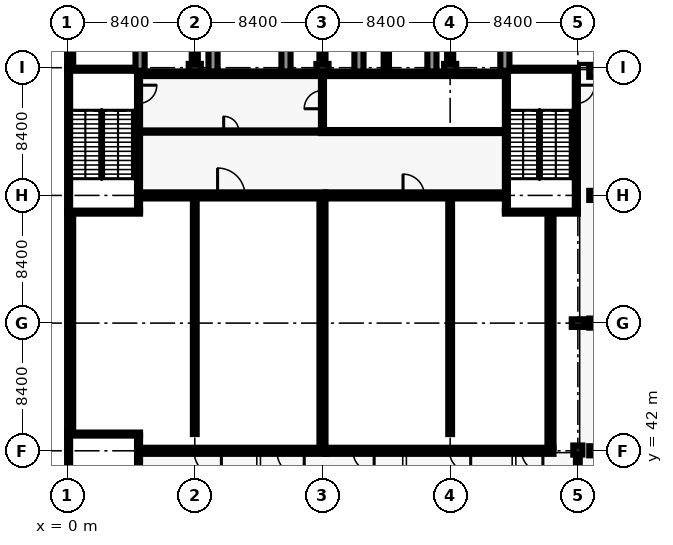
"""IFC4 building model, lengths in metres.
Left out: names, types, materials, properties, quantities, classifications, styles, units other than length and angle.
Written with IfcOpenShell. Run it as: python <this file> out.ifc"""

import sys

from ifc_helpers import new_model, si_unit, direction, frame, frame_2d, origin, origin_2d, place, context, subcontext, project, spatial, polyline, rectangle, outline, extrude, element, fill, save


model = new_model("IFC4")
c1 = context("Model", 3, precision=1e-05, world=origin(), true_north=direction((0.0, 1.0)))
c2 = subcontext(c1, "Body", "Model", "MODEL_VIEW")
j1 = project(units=[si_unit("LENGTHUNIT", "METRE"), si_unit("PLANEANGLEUNIT", "RADIAN")], contexts=[c1])
p1 = place(None, origin())
s1 = spatial("IfcSite", under=j1, at=p1, CompositionType="ELEMENT")
p2 = place(p1, origin())
s2 = spatial("IfcBuilding", under=s1, at=p2, CompositionType="ELEMENT")
p3 = place(p2, frame((0.0, 0.0, 10.2)))
s3 = spatial("IfcBuildingStorey", under=s2, at=p3, CompositionType="ELEMENT", Elevation=10.2)
p4 = place(p3, frame((0.0, 43.1, 0.0), z_axis=(0.0, 0.0, 1.0), x_axis=(1.0, 0.0, 0.0)))
e1 = element("IfcWall", 1, at=p4, inside=s3, PredefinedType="SHEAR", context=c2, shape_type="SweptSolid", body=[
    extrude(rectangle(XDim=4.8, YDim=0.2, at=frame_2d((2.4, 0.0))), origin(), (0.0, 0.0, 1.0), 4.8),
])
p5 = place(p3, frame((0.1, 33.8, 0.0), z_axis=(0.0, 0.0, 1.0), x_axis=(0.0, 1.0, 0.0)))
e2 = element("IfcWall", 2, at=p5, inside=s3, PredefinedType="SHEAR", context=c2, shape_type="SweptSolid", body=[
    extrude(rectangle(XDim=9.2, YDim=0.2, at=frame_2d((4.6, 0.0))), origin(), (0.0, 0.0, 1.0), 4.8),
])
p6 = place(p3, frame((4.7, 43.0, 0.0), z_axis=(0.0, 0.0, 1.0), x_axis=(0.0, -1.0, 0.0)))
e3 = element("IfcWall", 3, at=p6, inside=s3, PredefinedType="SHEAR", context=c2, shape_type="SweptSolid", body=[
    extrude(rectangle(XDim=9.2, YDim=0.2, at=frame_2d((4.6, 0.0))), origin(), (0.0, 0.0, 1.0), 4.8),
])
p7 = place(p6, frame((7.05, 0.0, 0.0)))
e4 = element("IfcOpeningElement", 4, at=p7, cuts=e3, PredefinedType="OPENING", context=c2, shape_type="SweptSolid", body=[
    extrude(rectangle(XDim=1.2, YDim=2.1, at=frame_2d((0.6, 1.05))), frame((0.0, 0.11, 0.0), z_axis=(0.0, -1.0, 0.0), x_axis=(1.0, 0.0, 0.0)), (0.0, 0.0, 1.0), 0.22),
])
for number, where, z_axis, x_axis in (
    (5, (4.8, 57.7, 0.0), (0.0, 0.0, 1.0), (-1.0, 0.0, 0.0)),
    (6, (0.0, 67.1, 0.0), (0.0, 0.0, 1.0), (1.0, 0.0, 0.0)),
):
    element("IfcWall", number, at=place(p3, frame(where, z_axis=z_axis, x_axis=x_axis)), inside=s3, PredefinedType="SHEAR", context=c2, shape_type="SweptSolid", body=[
        extrude(rectangle(XDim=4.8, YDim=0.2, at=frame_2d((2.4, 0.0))), origin(), (0.0, 0.0, 1.0), 4.8),
    ])
p8 = place(p3, frame((0.1, 57.8, 0.0), z_axis=(0.0, 0.0, 1.0), x_axis=(0.0, 1.0, 0.0)))
e7 = element("IfcWall", 7, at=p8, inside=s3, PredefinedType="SHEAR", context=c2, shape_type="SweptSolid", body=[
    extrude(rectangle(XDim=9.2, YDim=0.2, at=frame_2d((4.6, 0.0))), origin(), (0.0, 0.0, 1.0), 4.8),
])
p9 = place(p3, frame((4.7, 67.0, 0.0), z_axis=(0.0, 0.0, 1.0), x_axis=(0.0, -1.0, 0.0)))
e8 = element("IfcWall", 8, at=p9, inside=s3, PredefinedType="SHEAR", context=c2, shape_type="SweptSolid", body=[
    extrude(rectangle(XDim=9.2, YDim=0.2, at=frame_2d((4.6, 0.0))), origin(), (0.0, 0.0, 1.0), 4.8),
])
p10 = place(p9, frame((0.95, 0.0, 0.0)))
e9 = element("IfcOpeningElement", 9, at=p10, cuts=e8, PredefinedType="OPENING", context=c2, shape_type="SweptSolid", body=[
    extrude(rectangle(XDim=1.2, YDim=2.1, at=frame_2d((0.6, 1.05))), frame((0.0, 0.11, 0.0), z_axis=(0.0, -1.0, 0.0), x_axis=(1.0, 0.0, 0.0)), (0.0, 0.0, 1.0), 0.22),
])
for number, where, z_axis, x_axis in (
    (10, (33.6, 57.7, 0.0), (0.0, 0.0, 1.0), (-1.0, 0.0, 0.0)),
    (11, (28.8, 67.1, 0.0), (0.0, 0.0, 1.0), (1.0, 0.0, 0.0)),
):
    element("IfcWall", number, at=place(p3, frame(where, z_axis=z_axis, x_axis=x_axis)), inside=s3, PredefinedType="SHEAR", context=c2, shape_type="SweptSolid", body=[
        extrude(rectangle(XDim=4.8, YDim=0.2, at=frame_2d((2.4, 0.0))), origin(), (0.0, 0.0, 1.0), 4.8),
    ])
p11 = place(p3, frame((28.9, 57.8, 0.0), z_axis=(0.0, 0.0, 1.0), x_axis=(0.0, 1.0, 0.0)))
e12 = element("IfcWall", 12, at=p11, inside=s3, PredefinedType="SHEAR", context=c2, shape_type="SweptSolid", body=[
    extrude(rectangle(XDim=9.2, YDim=0.2, at=frame_2d((4.6, 0.0))), origin(), (0.0, 0.0, 1.0), 4.8),
])
p12 = place(p3, frame((33.5, 67.0, 0.0), z_axis=(0.0, 0.0, 1.0), x_axis=(0.0, -1.0, 0.0)))
e13 = element("IfcWall", 13, at=p12, inside=s3, PredefinedType="SHEAR", context=c2, shape_type="SweptSolid", body=[
    extrude(rectangle(XDim=9.2, YDim=0.2, at=frame_2d((4.6, 0.0))), origin(), (0.0, 0.0, 1.0), 4.8),
])
p13 = place(p12, frame((0.95, 0.0, 0.0)))
e14 = element("IfcOpeningElement", 14, at=p13, cuts=e13, PredefinedType="OPENING", context=c2, shape_type="SweptSolid", body=[
    extrude(rectangle(XDim=1.2, YDim=2.1, at=frame_2d((0.6, 1.05))), frame((0.0, 0.11, 0.0), z_axis=(0.0, -1.0, 0.0), x_axis=(1.0, 0.0, 0.0)), (0.0, 0.0, 1.0), 0.22),
])
p14 = place(p3, frame((17.0, 42.0, 0.0), z_axis=(0.0, 0.0, 1.0), x_axis=(-1.0, 0.0, 0.0)))
e15 = element("IfcWall", 15, at=p14, inside=s3, PredefinedType="SHEAR", context=c2, shape_type="SweptSolid", body=[
    extrude(rectangle(XDim=12.2, YDim=0.4, at=frame_2d((6.1, 0.0))), origin(), (0.0, 0.0, 1.0), 4.8),
])
p15 = place(p14, frame((6.85, 0.0, 0.0)))
e16 = element("IfcOpeningElement", 16, at=p15, cuts=e15, PredefinedType="OPENING", context=c2, shape_type="SweptSolid", body=[
    extrude(rectangle(XDim=1.8, YDim=2.1, at=frame_2d((0.9, 1.05))), frame((0.0, 0.21, 0.0), z_axis=(0.0, -1.0, 0.0), x_axis=(1.0, 0.0, 0.0)), (0.0, 0.0, 1.0), 0.42),
])
p16 = place(p14, frame((1.4, 0.0, 0.0)))
e17 = element("IfcOpeningElement", 17, at=p16, cuts=e15, PredefinedType="OPENING", context=c2, shape_type="SweptSolid", body=[
    extrude(rectangle(XDim=1.8, YDim=2.1, at=frame_2d((0.9, 1.05))), frame((0.0, 0.21, 0.0), z_axis=(0.0, -1.0, 0.0), x_axis=(1.0, 0.0, 0.0)), (0.0, 0.0, 1.0), 0.42),
])
p17 = place(p3, frame((4.8, 58.8, 0.0), z_axis=(0.0, 0.0, 1.0), x_axis=(1.0, 0.0, 0.0)))
e18 = element("IfcWall", 18, at=p17, inside=s3, PredefinedType="SHEAR", context=c2, shape_type="SweptSolid", body=[
    extrude(rectangle(XDim=12.2, YDim=0.4, at=frame_2d((6.1, 0.0))), origin(), (0.0, 0.0, 1.0), 4.8),
])
p18 = place(p17, frame((5.1, 0.0, 0.0)))
e19 = element("IfcOpeningElement", 19, at=p18, cuts=e18, PredefinedType="OPENING", context=c2, shape_type="SweptSolid", body=[
    extrude(rectangle(XDim=1.8, YDim=2.1, at=frame_2d((0.9, 1.05))), frame((0.0, 0.21, 0.0), z_axis=(0.0, -1.0, 0.0), x_axis=(1.0, 0.0, 0.0)), (0.0, 0.0, 1.0), 0.42),
])
p19 = place(p3, frame((0.2, 43.2, 0.0), z_axis=(0.0, 0.0, 1.0), x_axis=(0.0, 1.0, 0.0)))
e20 = element("IfcWall", 20, at=p19, inside=s3, PredefinedType="SHEAR", context=c2, shape_type="SweptSolid", body=[
    extrude(rectangle(XDim=14.4, YDim=0.4, at=frame_2d((7.2, 0.0))), origin(), (0.0, 0.0, 1.0), 4.8),
])
p20 = place(p3, frame((16.8, 58.6, 0.0), z_axis=(0.0, 0.0, 1.0), x_axis=(0.0, -1.0, 0.0)))
e21 = element("IfcWall", 21, at=p20, inside=s3, PredefinedType="SHEAR", context=c2, shape_type="SweptSolid", body=[
    extrude(rectangle(XDim=16.4, YDim=0.4, at=frame_2d((8.2, 0.0))), origin(), (0.0, 0.0, 1.0), 4.8),
])
p21 = place(p3, frame((32.0, 42.0, 0.0), z_axis=(0.0, 0.0, 1.0), x_axis=(-1.0, 0.0, 0.0)))
e22 = element("IfcWall", 22, at=p21, inside=s3, PredefinedType="SHEAR", context=c2, shape_type="SweptSolid", body=[
    extrude(rectangle(XDim=15.0, YDim=0.4, at=frame_2d((7.5, 0.0))), origin(), (0.0, 0.0, 1.0), 4.8),
])
p22 = place(p21, frame((0.7, 0.0, 0.0)))
e23 = element("IfcOpeningElement", 23, at=p22, cuts=e22, PredefinedType="OPENING", context=c2, shape_type="SweptSolid", body=[
    extrude(rectangle(XDim=1.4, YDim=2.1, at=frame_2d((0.7, 1.05))), frame((0.0, 0.21, 0.0), z_axis=(0.0, -1.0, 0.0), x_axis=(1.0, 0.0, 0.0)), (0.0, 0.0, 1.0), 0.42),
])
p23 = place(p21, frame((11.8, 0.0, 0.0)))
e24 = element("IfcOpeningElement", 24, at=p23, cuts=e22, PredefinedType="OPENING", context=c2, shape_type="SweptSolid", body=[
    extrude(rectangle(XDim=1.4, YDim=2.1, at=frame_2d((0.7, 1.05))), frame((0.0, 0.21, 0.0), z_axis=(0.0, -1.0, 0.0), x_axis=(1.0, 0.0, 0.0)), (0.0, 0.0, 1.0), 0.42),
])
p24 = place(p21, frame((5.45, 0.0, 0.0)))
e25 = element("IfcOpeningElement", 25, at=p24, cuts=e22, PredefinedType="OPENING", context=c2, shape_type="SweptSolid", body=[
    extrude(rectangle(XDim=1.4, YDim=2.1, at=frame_2d((0.7, 1.05))), frame((0.0, 0.21, 0.0), z_axis=(0.0, -1.0, 0.0), x_axis=(1.0, 0.0, 0.0)), (0.0, 0.0, 1.0), 0.42),
])
p25 = place(p3, frame((17.0, 58.8, 0.0), z_axis=(0.0, 0.0, 1.0), x_axis=(1.0, 0.0, 0.0)))
e26 = element("IfcWall", 26, at=p25, inside=s3, PredefinedType="SHEAR", context=c2, shape_type="SweptSolid", body=[
    extrude(rectangle(XDim=11.8, YDim=0.4, at=frame_2d((5.9, 0.0))), origin(), (0.0, 0.0, 1.0), 4.8),
])
p26 = place(p25, frame((5.1, 0.0, 0.0)))
e27 = element("IfcOpeningElement", 27, at=p26, cuts=e26, PredefinedType="OPENING", context=c2, shape_type="SweptSolid", body=[
    extrude(rectangle(XDim=1.4, YDim=2.1, at=frame_2d((0.7, 1.05))), frame((0.0, 0.21, 0.0), z_axis=(0.0, -1.0, 0.0), x_axis=(1.0, 0.0, 0.0)), (0.0, 0.0, 1.0), 0.42),
])
p27 = place(p3, frame((31.8, 57.6, 0.0), z_axis=(0.0, 0.0, 1.0), x_axis=(0.0, -1.0, 0.0)))
e28 = element("IfcWall", 28, at=p27, inside=s3, PredefinedType="SHEAR", context=c2, shape_type="SweptSolid", body=[
    extrude(rectangle(XDim=15.4, YDim=0.4, at=frame_2d((7.7, 0.0))), origin(), (0.0, 0.0, 1.0), 4.8),
])
for number, where, z_axis, x_axis in (
    (29, (8.4, 43.1, 0.0), (0.0, 0.0, 1.0), (0.0, 1.0, 0.0)),
    (30, (25.2, 43.1, 0.0), (0.0, 0.0, 1.0), (0.0, 1.0, 0.0)),
):
    element("IfcWall", number, at=place(p3, frame(where, z_axis=z_axis, x_axis=x_axis)), inside=s3, PredefinedType="SOLIDWALL", context=c2, shape_type="SweptSolid", body=[
        extrude(outline(polyline([(0.0, 0.0), (15.5, 0.0), (15.5, 2.324), (0.0, 0.154), (0.0, 0.0)])), frame((0.0, 0.125, 0.0), z_axis=(0.0, -1.0, 0.0), x_axis=(1.0, 0.0, 0.0)), (0.0, 0.0, 1.0), 0.25),
    ])
for number, where, z_axis, x_axis in (
    (31, (8.4, 67.2, 0.0), (0.0, 0.0, 1.0), (1.0, 0.0, 0.0)),
    (32, (16.8, 67.2, 0.0), (0.0, 0.0, 1.0), (1.0, 0.0, 0.0)),
    (33, (25.2, 67.2, 0.0), (0.0, 0.0, 1.0), (1.0, 0.0, 0.0)),
    (34, (33.6, 50.4, 0.0), (0.0, 0.0, 1.0), (0.0, 1.0, 0.0)),
):
    element("IfcColumn", number, at=place(p3, frame(where, z_axis=z_axis, x_axis=x_axis)), inside=s3, PredefinedType="COLUMN", context=c2, shape_type="SweptSolid", body=[
        extrude(rectangle(XDim=0.8, YDim=0.5, at=origin_2d()), origin(), (0.0, 0.0, 1.0), 4.8),
    ])
for number, where, z_axis, x_axis in (
    (35, (34.65, 42.0, 0.0), (0.0, 0.0, 1.0), (1.0, 0.0, 0.0)),
    (36, (34.65, 50.4, 0.0), (0.0, 0.0, 1.0), (1.0, 0.0, 0.0)),
    (37, (34.65, 58.8, 0.0), (0.0, 0.0, 1.0), (1.0, 0.0, 0.0)),
    (38, (34.65, 66.9, 0.0), (0.0, 0.0, 1.0), (1.0, 0.0, 0.0)),
    (39, (33.6, 42.05, 0.0), (0.0, 0.0, 1.0), (1.0, 0.0, 0.0)),
):
    element("IfcColumn", number, at=place(p3, frame(where, z_axis=z_axis, x_axis=x_axis)), inside=s3, PredefinedType="COLUMN", context=c2, shape_type="SweptSolid", body=[
        extrude(rectangle(XDim=0.6, YDim=0.6, at=origin_2d()), origin(), (0.0, 0.0, 1.0), 4.8),
    ])
p28 = place(p3, frame((4.8, 66.8, 0.0), z_axis=(0.0, 0.0, 1.0), x_axis=(1.0, 0.0, 0.0)))
e40 = element("IfcWall", 40, at=p28, inside=s3, PredefinedType="SOLIDWALL", context=c2, shape_type="SweptSolid", body=[
    extrude(rectangle(XDim=24.0, YDim=0.3, at=frame_2d((12.0, 0.0))), origin(), (0.0, 0.0, 1.0), 4.5),
])
p29 = place(p28, frame((0.6, 0.0, 0.9)))
e41 = element("IfcOpeningElement", 41, at=p29, cuts=e40, PredefinedType="OPENING", context=c2, shape_type="SweptSolid", body=[
    extrude(rectangle(XDim=1.8, YDim=1.5, at=frame_2d((0.9, 0.75))), frame((0.0, 0.16, 0.0), z_axis=(0.0, -1.0, 0.0), x_axis=(1.0, 0.0, 0.0)), (0.0, 0.0, 1.0), 0.32),
])
p30 = place(p28, frame((21.9, 0.0, 0.9)))
e42 = element("IfcOpeningElement", 42, at=p30, cuts=e40, PredefinedType="OPENING", context=c2, shape_type="SweptSolid", body=[
    extrude(rectangle(XDim=1.2, YDim=1.8, at=frame_2d((0.6, 0.9))), frame((0.0, 0.16, 0.0), z_axis=(0.0, -1.0, 0.0), x_axis=(1.0, 0.0, 0.0)), (0.0, 0.0, 1.0), 0.32),
])
for number, where, z_axis, x_axis in (
    (43, (0.2, 67.8, 0.0), (0.0, 0.0, 1.0), (1.0, 0.0, 0.0)),
    (44, (8.4, 68.05, 0.0), (0.0, 0.0, 1.0), (1.0, 0.0, 0.0)),
    (45, (16.8, 68.05, 0.0), (0.0, 0.0, 1.0), (1.0, 0.0, 0.0)),
):
    element("IfcColumn", number, at=place(p3, frame(where, z_axis=z_axis, x_axis=x_axis)), inside=s3, PredefinedType="PILASTER", context=c2, shape_type="SweptSolid", body=[
        extrude(rectangle(XDim=0.4, YDim=1.2, at=origin_2d()), origin(), (0.0, 0.0, 1.0), 4.8),
    ])
p31 = place(p3, frame((21.0, 67.65, 0.0), z_axis=(0.0, 0.0, 1.0), x_axis=(1.0, 0.0, 0.0)))
e46 = element("IfcColumn", 46, at=p31, inside=s3, PredefinedType="PILASTER", context=c2, shape_type="SweptSolid", body=[
    extrude(rectangle(XDim=0.35, YDim=0.9, at=origin_2d()), origin(), (0.0, 0.0, 1.0), 4.8),
])
p32 = place(p3, frame((25.2, 68.05, 0.0), z_axis=(0.0, 0.0, 1.0), x_axis=(1.0, 0.0, 0.0)))
e47 = element("IfcColumn", 47, at=p32, inside=s3, PredefinedType="PILASTER", context=c2, shape_type="SweptSolid", body=[
    extrude(rectangle(XDim=0.4, YDim=1.2, at=origin_2d()), origin(), (0.0, 0.0, 1.0), 4.8),
])
p33 = place(p3, frame((4.8, 67.0, 0.0), z_axis=(0.0, 0.0, 1.0), x_axis=(0.0, 1.0, 0.0)))
e48 = element("IfcWall", 48, at=p33, inside=s3, PredefinedType="SOLIDWALL", context=c2, shape_type="SweptSolid", body=[
    extrude(rectangle(XDim=1.7, YDim=0.6, at=frame_2d((0.85, 0.0))), origin(), (0.0, 0.0, 1.0), 4.8),
])
for number, where, z_axis, x_axis in (
    (49, (9.6, 66.95, 0.0), (0.0, 0.0, 1.0), (0.0, 1.0, 0.0)),
    (50, (14.4, 66.95, 0.0), (0.0, 0.0, 1.0), (0.0, 1.0, 0.0)),
    (51, (19.2, 66.95, 0.0), (0.0, 0.0, 1.0), (0.0, 1.0, 0.0)),
    (52, (24.0, 66.95, 0.0), (0.0, 0.0, 1.0), (0.0, 1.0, 0.0)),
):
    element("IfcWall", number, at=place(p3, frame(where, z_axis=z_axis, x_axis=x_axis)), inside=s3, PredefinedType="SOLIDWALL", context=c2, shape_type="SweptSolid", body=[
        extrude(rectangle(XDim=1.75, YDim=0.6, at=frame_2d((0.875, 0.0))), origin(), (0.0, 0.0, 1.0), 4.8),
    ])
p34 = place(p3, frame((28.8, 67.0, 0.0), z_axis=(0.0, 0.0, 1.0), x_axis=(0.0, 1.0, 0.0)))
e53 = element("IfcWall", 53, at=p34, inside=s3, PredefinedType="SOLIDWALL", context=c2, shape_type="SweptSolid", body=[
    extrude(rectangle(XDim=1.7, YDim=0.6, at=frame_2d((0.85, 0.0))), origin(), (0.0, 0.0, 1.0), 4.8),
])
p35 = place(p3, frame((33.6, 34.3, 0.0), z_axis=(0.0, 0.0, 1.0), x_axis=(0.0, 1.0, 0.0)))
e54 = element("IfcWall", 54, at=p35, inside=s3, PredefinedType="SOLIDWALL", context=c2, shape_type="SweptSolid", body=[
    extrude(rectangle(XDim=7.825, YDim=0.25, at=frame_2d((3.913, 0.0))), origin(), (0.0, 0.0, 1.0), 3.8),
])
p36 = place(p35, frame((2.9, 0.0, 0.0)))
e55 = element("IfcOpeningElement", 55, at=p36, cuts=e54, PredefinedType="OPENING", context=c2, shape_type="SweptSolid", body=[
    extrude(rectangle(XDim=1.2, YDim=2.1, at=frame_2d((0.6, 1.05))), frame((0.0, 0.135, 0.0), z_axis=(0.0, -1.0, 0.0), x_axis=(1.0, 0.0, 0.0)), (0.0, 0.0, 1.0), 0.27),
])
p37 = place(p3, frame((16.7, 63.0, 0.0), z_axis=(0.0, 0.0, 1.0), x_axis=(1.0, 0.0, 0.0)))
e56 = element("IfcWall", 56, at=p37, inside=s3, PredefinedType="SOLIDWALL", context=c2, shape_type="SweptSolid", body=[
    extrude(rectangle(XDim=12.1, YDim=0.2, at=frame_2d((6.05, 0.0))), origin(), (0.0, 0.0, 1.0), 3.8),
])
p38 = place(p3, frame((16.8, 63.1, 0.0), z_axis=(0.0, 0.0, 1.0), x_axis=(0.0, 1.0, 0.0)))
e57 = element("IfcWall", 57, at=p38, inside=s3, PredefinedType="SOLIDWALL", context=c2, shape_type="SweptSolid", body=[
    extrude(rectangle(XDim=3.55, YDim=0.2, at=frame_2d((1.775, 0.0))), origin(), (0.0, 0.0, 1.0), 3.8),
])
p39 = place(p38, frame((1.4, 0.0, 0.0)))
e58 = element("IfcOpeningElement", 58, at=p39, cuts=e57, PredefinedType="OPENING", context=c2, shape_type="SweptSolid", body=[
    extrude(rectangle(XDim=1.2, YDim=2.1, at=frame_2d((0.6, 1.05))), frame((0.0, 0.11, 0.0), z_axis=(0.0, -1.0, 0.0), x_axis=(1.0, 0.0, 0.0)), (0.0, 0.0, 1.0), 0.22),
])
p40 = place(p3, frame((16.8, 66.95, 0.0), z_axis=(0.0, 0.0, 1.0), x_axis=(0.0, 1.0, 0.0)))
e59 = element("IfcWall", 59, at=p40, inside=s3, PredefinedType="SOLIDWALL", context=c2, shape_type="SweptSolid", body=[
    extrude(rectangle(XDim=0.35, YDim=0.2, at=frame_2d((0.175, 0.0))), origin(), (0.0, 0.0, 1.0), 3.8),
])
p41 = place(p3, frame((4.8, 63.0, 0.0), z_axis=(0.0, 0.0, 1.0), x_axis=(1.0, 0.0, 0.0)))
e60 = element("IfcWall", 60, at=p41, inside=s3, PredefinedType="PARTITIONING", context=c2, shape_type="SweptSolid", body=[
    extrude(rectangle(XDim=11.9, YDim=0.15, at=frame_2d((5.95, 0.0))), origin(), (0.0, 0.0, 1.0), 3.8),
])
p42 = place(p41, frame((5.5, 0.0, 0.0)))
e61 = element("IfcOpeningElement", 61, at=p42, cuts=e60, PredefinedType="OPENING", context=c2, shape_type="SweptSolid", body=[
    extrude(rectangle(XDim=1.0, YDim=2.1, at=frame_2d((0.5, 1.05))), frame((0.0, 0.085, 0.0), z_axis=(0.0, -1.0, 0.0), x_axis=(1.0, 0.0, 0.0)), (0.0, 0.0, 1.0), 0.17),
])
p43 = place(p29, origin())
e62 = element("IfcWindow", 62, at=p43, inside=s3, PartitioningType="SINGLE_PANEL", PredefinedType="WINDOW", context=c2, shape_type="SweptSolid", body=[
    extrude(rectangle(XDim=1.8, YDim=1.5, at=frame_2d((0.9, 0.75))), frame((0.0, 0.03, 0.0), z_axis=(0.0, -1.0, 0.0), x_axis=(1.0, 0.0, 0.0)), (0.0, 0.0, 1.0), 0.06),
])
fill(e41, e62)
p44 = place(p30, origin())
e63 = element("IfcWindow", 63, at=p44, inside=s3, PartitioningType="SINGLE_PANEL", PredefinedType="WINDOW", context=c2, shape_type="SweptSolid", body=[
    extrude(rectangle(XDim=1.2, YDim=1.8, at=frame_2d((0.6, 0.9))), frame((0.0, 0.03, 0.0), z_axis=(0.0, -1.0, 0.0), x_axis=(1.0, 0.0, 0.0)), (0.0, 0.0, 1.0), 0.06),
])
fill(e42, e63)
p45 = place(p10, origin())
e64 = element("IfcDoor", 64, at=p45, inside=s3, OperationType="SINGLE_SWING_RIGHT", PredefinedType="DOOR", context=c2, shape_type="SweptSolid", body=[
    extrude(rectangle(XDim=1.2, YDim=2.1, at=frame_2d((0.6, 1.05))), frame((0.0, 0.025, 0.0), z_axis=(0.0, -1.0, 0.0), x_axis=(1.0, 0.0, 0.0)), (0.0, 0.0, 1.0), 0.05),
])
fill(e9, e64)
p46 = place(p13, origin())
e65 = element("IfcDoor", 65, at=p46, inside=s3, OperationType="SINGLE_SWING_RIGHT", PredefinedType="DOOR", context=c2, shape_type="SweptSolid", body=[
    extrude(rectangle(XDim=1.2, YDim=2.1, at=frame_2d((0.6, 1.05))), frame((0.0, 0.025, 0.0), z_axis=(0.0, -1.0, 0.0), x_axis=(1.0, 0.0, 0.0)), (0.0, 0.0, 1.0), 0.05),
])
fill(e14, e65)
p47 = place(p15, origin())
e66 = element("IfcDoor", 66, at=p47, inside=s3, OperationType="DOUBLE_DOOR_SINGLE_SWING", PredefinedType="DOOR", context=c2, shape_type="SweptSolid", body=[
    extrude(rectangle(XDim=1.8, YDim=2.1, at=frame_2d((0.9, 1.05))), frame((0.0, 0.025, 0.0), z_axis=(0.0, -1.0, 0.0), x_axis=(1.0, 0.0, 0.0)), (0.0, 0.0, 1.0), 0.05),
])
fill(e16, e66)
p48 = place(p42, origin())
e67 = element("IfcDoor", 67, at=p48, inside=s3, OperationType="SINGLE_SWING_RIGHT", PredefinedType="DOOR", context=c2, shape_type="SweptSolid", body=[
    extrude(rectangle(XDim=1.0, YDim=2.1, at=frame_2d((0.5, 1.05))), frame((0.0, 0.025, 0.0), z_axis=(0.0, -1.0, 0.0), x_axis=(1.0, 0.0, 0.0)), (0.0, 0.0, 1.0), 0.05),
])
fill(e61, e67)
p49 = place(p39, origin())
e68 = element("IfcDoor", 68, at=p49, inside=s3, OperationType="SINGLE_SWING_LEFT", PredefinedType="DOOR", context=c2, shape_type="SweptSolid", body=[
    extrude(rectangle(XDim=1.2, YDim=2.1, at=frame_2d((0.6, 1.05))), frame((0.0, 0.025, 0.0), z_axis=(0.0, -1.0, 0.0), x_axis=(1.0, 0.0, 0.0)), (0.0, 0.0, 1.0), 0.05),
])
fill(e58, e68)
p50 = place(p22, origin())
e69 = element("IfcDoor", 69, at=p50, inside=s3, OperationType="DOUBLE_DOOR_SINGLE_SWING", PredefinedType="DOOR", context=c2, shape_type="SweptSolid", body=[
    extrude(rectangle(XDim=1.4, YDim=2.1, at=frame_2d((0.7, 1.05))), frame((0.0, 0.025, 0.0), z_axis=(0.0, -1.0, 0.0), x_axis=(1.0, 0.0, 0.0)), (0.0, 0.0, 1.0), 0.05),
])
fill(e23, e69)
p51 = place(p16, origin())
e70 = element("IfcDoor", 70, at=p51, inside=s3, OperationType="DOUBLE_DOOR_SINGLE_SWING", PredefinedType="DOOR", context=c2, shape_type="SweptSolid", body=[
    extrude(rectangle(XDim=1.8, YDim=2.1, at=frame_2d((0.9, 1.05))), frame((0.0, 0.025, 0.0), z_axis=(0.0, -1.0, 0.0), x_axis=(1.0, 0.0, 0.0)), (0.0, 0.0, 1.0), 0.05),
])
fill(e17, e70)
p52 = place(p18, origin())
e71 = element("IfcDoor", 71, at=p52, inside=s3, OperationType="DOUBLE_DOOR_SINGLE_SWING", PredefinedType="DOOR", context=c2, shape_type="SweptSolid", body=[
    extrude(rectangle(XDim=1.8, YDim=2.1, at=frame_2d((0.9, 1.05))), frame((0.0, 0.025, 0.0), z_axis=(0.0, -1.0, 0.0), x_axis=(1.0, 0.0, 0.0)), (0.0, 0.0, 1.0), 0.05),
])
fill(e19, e71)
p53 = place(p23, origin())
e72 = element("IfcDoor", 72, at=p53, inside=s3, OperationType="DOUBLE_DOOR_SINGLE_SWING", PredefinedType="DOOR", context=c2, shape_type="SweptSolid", body=[
    extrude(rectangle(XDim=1.4, YDim=2.1, at=frame_2d((0.7, 1.05))), frame((0.0, 0.025, 0.0), z_axis=(0.0, -1.0, 0.0), x_axis=(1.0, 0.0, 0.0)), (0.0, 0.0, 1.0), 0.05),
])
fill(e24, e72)
p54 = place(p24, origin())
e73 = element("IfcDoor", 73, at=p54, inside=s3, OperationType="DOUBLE_DOOR_SINGLE_SWING", PredefinedType="DOOR", context=c2, shape_type="SweptSolid", body=[
    extrude(rectangle(XDim=1.4, YDim=2.1, at=frame_2d((0.7, 1.05))), frame((0.0, 0.025, 0.0), z_axis=(0.0, -1.0, 0.0), x_axis=(1.0, 0.0, 0.0)), (0.0, 0.0, 1.0), 0.05),
])
fill(e25, e73)
p55 = place(p26, origin())
e74 = element("IfcDoor", 74, at=p55, inside=s3, OperationType="DOUBLE_DOOR_SINGLE_SWING", PredefinedType="DOOR", context=c2, shape_type="SweptSolid", body=[
    extrude(rectangle(XDim=1.4, YDim=2.1, at=frame_2d((0.7, 1.05))), frame((0.0, 0.025, 0.0), z_axis=(0.0, -1.0, 0.0), x_axis=(1.0, 0.0, 0.0)), (0.0, 0.0, 1.0), 0.05),
])
fill(e27, e74)
save(model, sys.argv[1])
